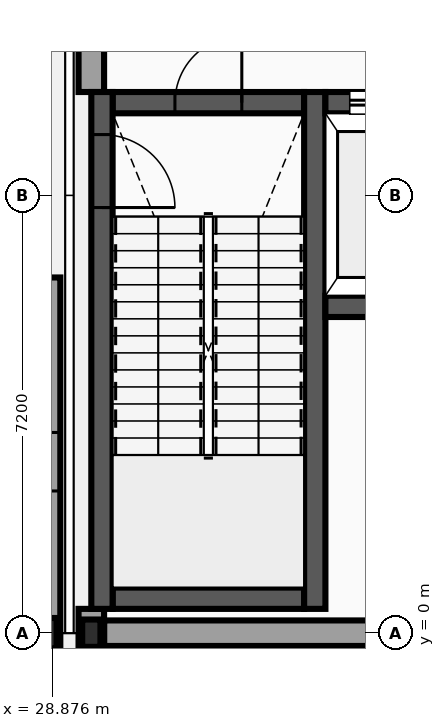
"""IFC4 building model, lengths in metres.
Left out: names, types, materials, properties, quantities, classifications, styles, units other than length and angle.
Written with IfcOpenShell. Run it as: python <this file> out.ifc"""

import sys

from ifc_helpers import new_model, si_unit, direction, frame, frame_2d, origin, origin_2d, place, context, subcontext, project, spatial, rectangle, i_section, extrude, element, fill, save


model = new_model("IFC4")
c1 = context("Model", 3, precision=1e-05, world=origin(), true_north=direction((0.0, 1.0)))
c2 = subcontext(c1, "Body", "Model", "MODEL_VIEW")
j1 = project(units=[si_unit("LENGTHUNIT", "METRE"), si_unit("PLANEANGLEUNIT", "RADIAN")], contexts=[c1])
p1 = place(None, origin())
s1 = spatial("IfcSite", under=j1, at=p1, CompositionType="ELEMENT")
p2 = place(p1, origin())
s2 = spatial("IfcBuilding", under=s1, at=p2, CompositionType="ELEMENT")
p3 = place(p2, origin())
s3 = spatial("IfcBuildingStorey", under=s2, at=p3, CompositionType="ELEMENT", Elevation=0.0)
p4 = place(p3, frame((28.8, 0.0, 0.0), z_axis=(0.0, 0.0, 1.0), x_axis=(1.0, 0.0, 0.0)))
e1 = element("IfcColumn", 1, at=p4, inside=s3, PredefinedType="COLUMN", context=c2, shape_type="SweptSolid", body=[
    extrude(i_section(OverallWidth=0.3, OverallDepth=0.5, WebThickness=0.014, FlangeThickness=0.028, FilletRadius=0.027, at=origin_2d()), origin(), (0.0, 0.0, 1.0), 5.2),
])
p5 = place(p3, frame((29.52, 0.0, 0.0), z_axis=(0.0, 0.0, 1.0), x_axis=(1.0, 0.0, 0.0)))
e2 = element("IfcColumn", 2, at=p5, inside=s3, PredefinedType="COLUMN", context=c2, shape_type="SweptSolid", body=[
    extrude(i_section(OverallWidth=0.3, OverallDepth=0.45, WebThickness=0.014, FlangeThickness=0.026, FilletRadius=0.027, at=origin_2d()), origin(), (0.0, 0.0, 1.0), 5.2),
])
p6 = place(p3, frame((28.8, -0.21, 0.0), z_axis=(0.0, 0.0, 1.0), x_axis=(0.0, 1.0, 0.0)))
e3 = element("IfcWall", 3, at=p6, inside=s3, PredefinedType="STANDARD", context=c2, shape_type="SweptSolid", body=[
    extrude(rectangle(XDim=6.06, YDim=0.42, at=frame_2d((3.03, 0.0))), origin(), (0.0, 0.0, 1.0), 4.97),
])
p7 = place(p6, frame((2.549, 0.0, 0.95)))
e4 = element("IfcOpeningElement", 4, at=p7, cuts=e3, PredefinedType="OPENING", context=c2, shape_type="SweptSolid", body=[
    extrude(rectangle(XDim=0.962, YDim=1.26, at=frame_2d((0.481, 0.63))), frame((0.0, 0.22, 0.0), z_axis=(0.0, -1.0, 0.0), x_axis=(1.0, 0.0, 0.0)), (0.0, 0.0, 1.0), 0.44),
])
p8 = place(p3, frame((29.73, 0.0, 0.0), z_axis=(0.0, 0.0, 1.0), x_axis=(1.0, 0.0, 0.0)))
e5 = element("IfcWall", 5, at=p8, inside=s3, PredefinedType="STANDARD", context=c2, shape_type="SweptSolid", body=[
    extrude(rectangle(XDim=6.38, YDim=0.42, at=frame_2d((3.19, 0.0))), origin(), (0.0, 0.0, 1.0), 4.665),
])
p9 = place(p3, frame((29.52, 0.4, 0.0), z_axis=(0.0, 0.0, 1.0), x_axis=(0.0, -1.0, 0.0)))
e6 = element("IfcWall", 6, at=p9, inside=s3, PredefinedType="STANDARD", context=c2, shape_type="SweptSolid", body=[
    extrude(rectangle(XDim=0.61, YDim=0.42, at=frame_2d((0.305, 0.0))), origin(), (0.0, 0.0, 1.0), 4.97),
])
p10 = place(p3, frame((29.52, 14.4, 0.0), z_axis=(0.0, 0.0, 1.0), x_axis=(0.0, -1.0, 0.0)))
e7 = element("IfcWall", 7, at=p10, inside=s3, PredefinedType="STANDARD", context=c2, shape_type="SweptSolid", body=[
    extrude(rectangle(XDim=5.5, YDim=0.42, at=frame_2d((2.75, 0.0))), origin(), (0.0, 0.0, 1.0), 4.97),
])
p11 = place(p3, frame((29.87, 0.575, 0.0), z_axis=(0.0, 0.0, 1.0), x_axis=(1.0, 0.0, 0.0)))
e8 = element("IfcWall", 8, at=p11, inside=s3, PredefinedType="SHEAR", context=c2, shape_type="SweptSolid", body=[
    extrude(rectangle(XDim=3.15, YDim=0.35, at=frame_2d((1.575, 0.0))), origin(), (0.0, 0.0, 1.0), 4.97),
])
p12 = place(p3, frame((29.87, 8.725, 0.0), z_axis=(0.0, 0.0, 1.0), x_axis=(1.0, 0.0, 0.0)))
e9 = element("IfcWall", 9, at=p12, inside=s3, PredefinedType="SHEAR", context=c2, shape_type="SweptSolid", body=[
    extrude(rectangle(XDim=3.15, YDim=0.35, at=frame_2d((1.575, 0.0))), origin(), (0.0, 0.0, 1.0), 4.97),
])
p13 = place(p12, frame((1.025, 0.0, 0.0)))
e10 = element("IfcOpeningElement", 10, at=p13, cuts=e9, PredefinedType="OPENING", context=c2, shape_type="SweptSolid", body=[
    extrude(rectangle(XDim=1.1, YDim=2.15, at=frame_2d((0.55, 1.075))), frame((0.0, 0.185, 0.0), z_axis=(0.0, -1.0, 0.0), x_axis=(1.0, 0.0, 0.0)), (0.0, 0.0, 1.0), 0.37),
])
p14 = place(p3, frame((29.695, 0.4, 0.0), z_axis=(0.0, 0.0, 1.0), x_axis=(0.0, 1.0, 0.0)))
e11 = element("IfcWall", 11, at=p14, inside=s3, PredefinedType="SHEAR", context=c2, shape_type="SweptSolid", body=[
    extrude(rectangle(XDim=8.5, YDim=0.35, at=frame_2d((4.25, 0.0))), origin(), (0.0, 0.0, 1.0), 4.97),
])
p15 = place(p14, frame((6.6, 0.0, 0.0)))
e12 = element("IfcOpeningElement", 12, at=p15, cuts=e11, PredefinedType="OPENING", context=c2, shape_type="SweptSolid", body=[
    extrude(rectangle(XDim=1.2, YDim=2.15, at=frame_2d((0.6, 1.075))), frame((0.0, 0.185, 0.0), z_axis=(0.0, -1.0, 0.0), x_axis=(1.0, 0.0, 0.0)), (0.0, 0.0, 1.0), 0.37),
])
p16 = place(p3, frame((33.195, 0.4, 0.0), z_axis=(0.0, 0.0, 1.0), x_axis=(0.0, 1.0, 0.0)))
e13 = element("IfcWall", 13, at=p16, inside=s3, PredefinedType="SHEAR", context=c2, shape_type="SweptSolid", body=[
    extrude(rectangle(XDim=8.5, YDim=0.35, at=frame_2d((4.25, 0.0))), origin(), (0.0, 0.0, 1.0), 4.97),
])
p17 = place(p3, frame((33.37, 5.375, 0.0), z_axis=(0.0, 0.0, 1.0), x_axis=(1.0, 0.0, 0.0)))
e14 = element("IfcWall", 14, at=p17, inside=s3, PredefinedType="SHEAR", context=c2, shape_type="SweptSolid", body=[
    extrude(rectangle(XDim=2.0, YDim=0.35, at=frame_2d((1.0, 0.0))), origin(), (0.0, 0.0, 1.0), 4.97),
])
p18 = place(p3, frame((33.37, 8.725, 0.0), z_axis=(0.0, 0.0, 1.0), x_axis=(1.0, 0.0, 0.0)))
e15 = element("IfcWall", 15, at=p18, inside=s3, PredefinedType="SHEAR", context=c2, shape_type="SweptSolid", body=[
    extrude(rectangle(XDim=2.0, YDim=0.35, at=frame_2d((1.0, 0.0))), origin(), (0.0, 0.0, 1.0), 4.97),
])
p19 = place(p18, frame((0.4, 0.0, 0.0)))
e16 = element("IfcOpeningElement", 16, at=p19, cuts=e15, PredefinedType="OPENING", context=c2, shape_type="SweptSolid", body=[
    extrude(rectangle(XDim=1.2, YDim=2.2, at=frame_2d((0.6, 1.1))), frame((0.0, 0.185, 0.0), z_axis=(0.0, -1.0, 0.0), x_axis=(1.0, 0.0, 0.0)), (0.0, 0.0, 1.0), 0.37),
])
p20 = place(p13, frame((1.1, 0.0, 0.0), z_axis=(0.0, 0.0, 1.0), x_axis=(-1.0, 0.0, 0.0)))
e17 = element("IfcDoor", 17, at=p20, inside=s3, OperationType="SINGLE_SWING_RIGHT", PredefinedType="DOOR", context=c2, shape_type="SweptSolid", body=[
    extrude(rectangle(XDim=1.1, YDim=2.15, at=frame_2d((0.55, 1.075))), frame((0.0, 0.025, 0.0), z_axis=(0.0, -1.0, 0.0), x_axis=(1.0, 0.0, 0.0)), (0.0, 0.0, 1.0), 0.05),
])
fill(e10, e17)
p21 = place(p15, frame((1.2, 0.0, 0.0), z_axis=(0.0, 0.0, 1.0), x_axis=(-1.0, 0.0, 0.0)))
e18 = element("IfcDoor", 18, at=p21, inside=s3, OperationType="SINGLE_SWING_LEFT", PredefinedType="DOOR", context=c2, shape_type="SweptSolid", body=[
    extrude(rectangle(XDim=1.2, YDim=2.15, at=frame_2d((0.6, 1.075))), frame((0.0, 0.025, 0.0), z_axis=(0.0, -1.0, 0.0), x_axis=(1.0, 0.0, 0.0)), (0.0, 0.0, 1.0), 0.05),
])
fill(e12, e18)
p22 = place(p19, origin())
e19 = element("IfcDoor", 19, at=p22, inside=s3, OperationType="SLIDING_TO_RIGHT", PredefinedType="DOOR", context=c2, shape_type="SweptSolid", body=[
    extrude(rectangle(XDim=1.2, YDim=2.2, at=frame_2d((0.6, 1.1))), frame((0.0, 0.025, 0.0), z_axis=(0.0, -1.0, 0.0), x_axis=(1.0, 0.0, 0.0)), (0.0, 0.0, 1.0), 0.05),
])
fill(e16, e19)
save(model, sys.argv[1])
